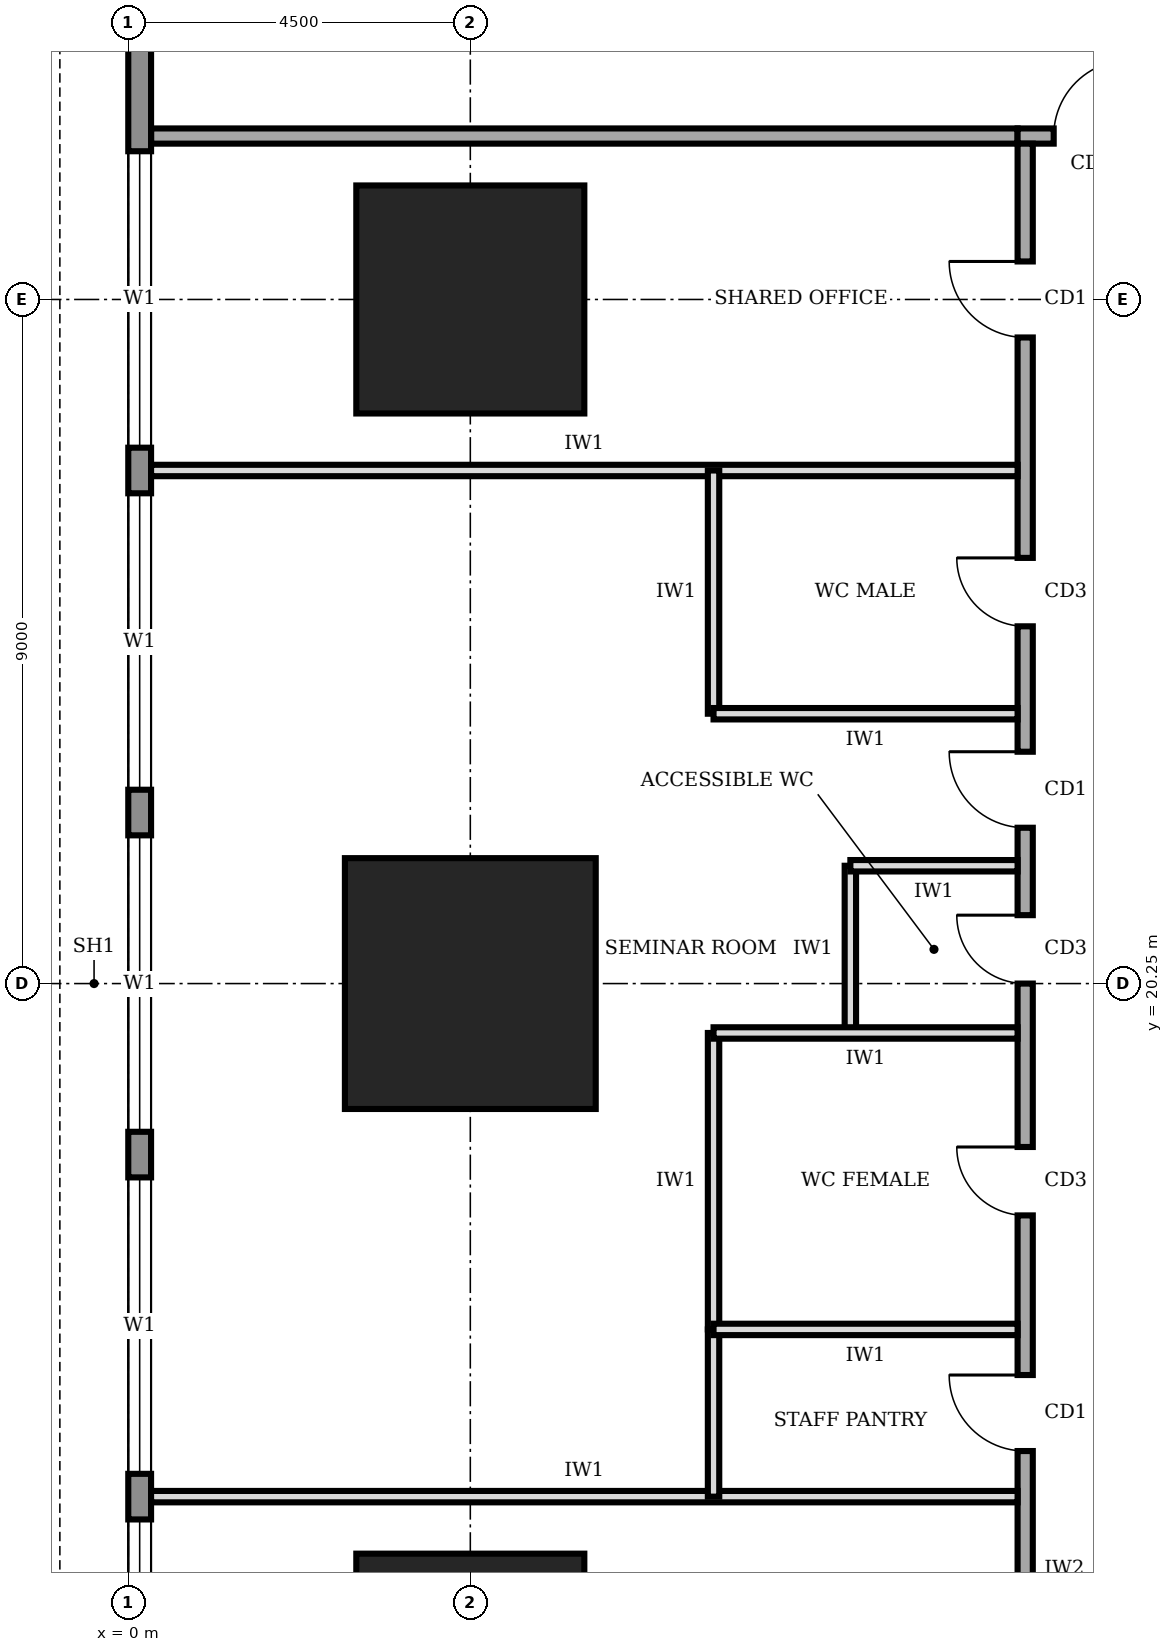
"""IFC4 building model, lengths in metres.
Left out: names, types, materials, properties, quantities, classifications, styles, units other than length and angle.
Written with IfcOpenShell. Run it as: python <this file> out.ifc"""

import sys

from ifc_helpers import new_model, si_unit, direction, frame, frame_2d, origin, origin_2d, place, context, subcontext, project, spatial, rectangle, extrude, element, fill, save


model = new_model("IFC4")
c1 = context("Model", 3, precision=1e-05, world=origin(), true_north=direction((0.0, 1.0)))
c2 = subcontext(c1, "Body", "Model", "MODEL_VIEW")
j1 = project(units=[si_unit("LENGTHUNIT", "METRE"), si_unit("PLANEANGLEUNIT", "RADIAN")], contexts=[c1])
p1 = place(None, origin())
s1 = spatial("IfcSite", under=j1, at=p1, CompositionType="ELEMENT")
p2 = place(p1, origin())
s2 = spatial("IfcBuilding", under=s1, at=p2, CompositionType="ELEMENT")
p3 = place(p2, frame((0.0, 0.0, 25.0)))
s3 = spatial("IfcBuildingStorey", under=s2, at=p3, CompositionType="ELEMENT", Elevation=25.0)
p4 = place(p3, frame((4.5, 11.25, 0.0), z_axis=(0.0, 0.0, 1.0), x_axis=(1.0, 0.0, 0.0)))
e1 = element("IfcColumn", 1, at=p4, inside=s3, PredefinedType="COLUMN", context=c2, shape_type="SweptSolid", body=[
    extrude(rectangle(XDim=3.0, YDim=3.0, at=origin_2d()), origin(), (0.0, 0.0, 1.0), 4.0),
])
p5 = place(p3, frame((4.5, 20.25, 0.0), z_axis=(0.0, 0.0, 1.0), x_axis=(1.0, 0.0, 0.0)))
e2 = element("IfcColumn", 2, at=p5, inside=s3, PredefinedType="COLUMN", context=c2, shape_type="SweptSolid", body=[
    extrude(rectangle(XDim=3.3, YDim=3.3, at=origin_2d()), origin(), (0.0, 0.0, 1.0), 4.0),
])
p6 = place(p3, frame((4.5, 29.25, 0.0), z_axis=(0.0, 0.0, 1.0), x_axis=(1.0, 0.0, 0.0)))
e3 = element("IfcColumn", 3, at=p6, inside=s3, PredefinedType="COLUMN", context=c2, shape_type="SweptSolid", body=[
    extrude(rectangle(XDim=3.0, YDim=3.0, at=origin_2d()), origin(), (0.0, 0.0, 1.0), 4.0),
])
p7 = place(p3, frame((0.15, 35.98, 0.0), z_axis=(0.0, 0.0, 1.0), x_axis=(0.0, -1.0, 0.0)))
e4 = element("IfcWall", 4, at=p7, inside=s3, PredefinedType="STANDARD", context=c2, shape_type="SweptSolid", body=[
    extrude(rectangle(XDim=31.46, YDim=0.3, at=frame_2d((15.73, 0.0))), origin(), (0.0, 0.0, 1.0), 3.75),
])
p8 = place(p7, frame((27.28, 0.0, 0.9)))
e5 = element("IfcOpeningElement", 5, at=p8, cuts=e4, PredefinedType="OPENING", context=c2, shape_type="SweptSolid", body=[
    extrude(rectangle(XDim=3.9, YDim=2.2, at=frame_2d((1.95, 1.1))), frame((0.0, 0.16, 0.0), z_axis=(0.0, -1.0, 0.0), x_axis=(1.0, 0.0, 0.0)), (0.0, 0.0, 1.0), 0.32),
])
p9 = place(p7, frame((22.78, 0.0, 0.9)))
e6 = element("IfcOpeningElement", 6, at=p9, cuts=e4, PredefinedType="OPENING", context=c2, shape_type="SweptSolid", body=[
    extrude(rectangle(XDim=3.9, YDim=2.2, at=frame_2d((1.95, 1.1))), frame((0.0, 0.16, 0.0), z_axis=(0.0, -1.0, 0.0), x_axis=(1.0, 0.0, 0.0)), (0.0, 0.0, 1.0), 0.32),
])
p10 = place(p7, frame((18.28, 0.0, 0.9)))
e7 = element("IfcOpeningElement", 7, at=p10, cuts=e4, PredefinedType="OPENING", context=c2, shape_type="SweptSolid", body=[
    extrude(rectangle(XDim=3.9, YDim=2.2, at=frame_2d((1.95, 1.1))), frame((0.0, 0.16, 0.0), z_axis=(0.0, -1.0, 0.0), x_axis=(1.0, 0.0, 0.0)), (0.0, 0.0, 1.0), 0.32),
])
p11 = place(p7, frame((13.78, 0.0, 0.9)))
e8 = element("IfcOpeningElement", 8, at=p11, cuts=e4, PredefinedType="OPENING", context=c2, shape_type="SweptSolid", body=[
    extrude(rectangle(XDim=3.9, YDim=2.2, at=frame_2d((1.95, 1.1))), frame((0.0, 0.16, 0.0), z_axis=(0.0, -1.0, 0.0), x_axis=(1.0, 0.0, 0.0)), (0.0, 0.0, 1.0), 0.32),
])
p12 = place(p7, frame((9.28, 0.0, 0.9)))
e9 = element("IfcOpeningElement", 9, at=p12, cuts=e4, PredefinedType="OPENING", context=c2, shape_type="SweptSolid", body=[
    extrude(rectangle(XDim=3.9, YDim=2.2, at=frame_2d((1.95, 1.1))), frame((0.0, 0.16, 0.0), z_axis=(0.0, -1.0, 0.0), x_axis=(1.0, 0.0, 0.0)), (0.0, 0.0, 1.0), 0.32),
])
p13 = place(p7, frame((4.78, 0.0, 0.9)))
e10 = element("IfcOpeningElement", 10, at=p13, cuts=e4, PredefinedType="OPENING", context=c2, shape_type="SweptSolid", body=[
    extrude(rectangle(XDim=3.9, YDim=2.2, at=frame_2d((1.95, 1.1))), frame((0.0, 0.16, 0.0), z_axis=(0.0, -1.0, 0.0), x_axis=(1.0, 0.0, 0.0)), (0.0, 0.0, 1.0), 0.32),
])
p14 = place(p3, frame((28.6, 31.4, 0.0), z_axis=(0.0, 0.0, 1.0), x_axis=(-1.0, 0.0, 0.0)))
e11 = element("IfcWall", 11, at=p14, inside=s3, PredefinedType="SOLIDWALL", context=c2, shape_type="SweptSolid", body=[
    extrude(rectangle(XDim=16.9, YDim=0.2, at=frame_2d((8.45, 0.0))), origin(), (0.0, 0.0, 1.0), 3.75),
])
p15 = place(p14, frame((15.425, 0.0, 0.0)))
e12 = element("IfcOpeningElement", 12, at=p15, cuts=e11, PredefinedType="OPENING", context=c2, shape_type="SweptSolid", body=[
    extrude(rectangle(XDim=1.0, YDim=2.1, at=frame_2d((0.5, 1.05))), frame((0.0, 0.11, 0.0), z_axis=(0.0, -1.0, 0.0), x_axis=(1.0, 0.0, 0.0)), (0.0, 0.0, 1.0), 0.22),
])
p16 = place(p14, frame((12.35, 0.0, 0.0)))
e13 = element("IfcOpeningElement", 13, at=p16, cuts=e11, PredefinedType="OPENING", context=c2, shape_type="SweptSolid", body=[
    extrude(rectangle(XDim=1.0, YDim=2.1, at=frame_2d((0.5, 1.05))), frame((0.0, 0.11, 0.0), z_axis=(0.0, -1.0, 0.0), x_axis=(1.0, 0.0, 0.0)), (0.0, 0.0, 1.0), 0.22),
])
p17 = place(p14, frame((5.6, 0.0, 0.0)))
e14 = element("IfcOpeningElement", 14, at=p17, cuts=e11, PredefinedType="OPENING", context=c2, shape_type="SweptSolid", body=[
    extrude(rectangle(XDim=1.0, YDim=2.1, at=frame_2d((0.5, 1.05))), frame((0.0, 0.11, 0.0), z_axis=(0.0, -1.0, 0.0), x_axis=(1.0, 0.0, 0.0)), (0.0, 0.0, 1.0), 0.22),
])
p18 = place(p14, frame((0.275, 0.0, 0.0)))
e15 = element("IfcOpeningElement", 15, at=p18, cuts=e11, PredefinedType="OPENING", context=c2, shape_type="SweptSolid", body=[
    extrude(rectangle(XDim=1.0, YDim=2.1, at=frame_2d((0.5, 1.05))), frame((0.0, 0.11, 0.0), z_axis=(0.0, -1.0, 0.0), x_axis=(1.0, 0.0, 0.0)), (0.0, 0.0, 1.0), 0.22),
])
p19 = place(p3, frame((11.8, 31.3, 0.0), z_axis=(0.0, 0.0, 1.0), x_axis=(0.0, -1.0, 0.0)))
e16 = element("IfcWall", 16, at=p19, inside=s3, PredefinedType="SOLIDWALL", context=c2, shape_type="SweptSolid", body=[
    extrude(rectangle(XDim=23.8, YDim=0.2, at=frame_2d((11.9, 0.0))), origin(), (0.0, 0.0, 1.0), 3.75),
])
p20 = place(p19, frame((20.3, 0.0, 0.0)))
e17 = element("IfcOpeningElement", 17, at=p20, cuts=e16, PredefinedType="OPENING", context=c2, shape_type="SweptSolid", body=[
    extrude(rectangle(XDim=1.0, YDim=2.1, at=frame_2d((0.5, 1.05))), frame((0.0, 0.11, 0.0), z_axis=(0.0, -1.0, 0.0), x_axis=(1.0, 0.0, 0.0)), (0.0, 0.0, 1.0), 0.22),
])
p21 = place(p19, frame((16.2, 0.0, 0.0)))
e18 = element("IfcOpeningElement", 18, at=p21, cuts=e16, PredefinedType="OPENING", context=c2, shape_type="SweptSolid", body=[
    extrude(rectangle(XDim=1.0, YDim=2.1, at=frame_2d((0.5, 1.05))), frame((0.0, 0.11, 0.0), z_axis=(0.0, -1.0, 0.0), x_axis=(1.0, 0.0, 0.0)), (0.0, 0.0, 1.0), 0.22),
])
p22 = place(p19, frame((13.2, 0.0, 0.0)))
e19 = element("IfcOpeningElement", 19, at=p22, cuts=e16, PredefinedType="OPENING", context=c2, shape_type="SweptSolid", body=[
    extrude(rectangle(XDim=0.9, YDim=2.1, at=frame_2d((0.45, 1.05))), frame((0.0, 0.11, 0.0), z_axis=(0.0, -1.0, 0.0), x_axis=(1.0, 0.0, 0.0)), (0.0, 0.0, 1.0), 0.22),
])
p23 = place(p19, frame((10.15, 0.0, 0.0)))
e20 = element("IfcOpeningElement", 20, at=p23, cuts=e16, PredefinedType="OPENING", context=c2, shape_type="SweptSolid", body=[
    extrude(rectangle(XDim=0.9, YDim=2.1, at=frame_2d((0.45, 1.05))), frame((0.0, 0.11, 0.0), z_axis=(0.0, -1.0, 0.0), x_axis=(1.0, 0.0, 0.0)), (0.0, 0.0, 1.0), 0.22),
])
p24 = place(p19, frame((5.45, 0.0, 0.0)))
e21 = element("IfcOpeningElement", 21, at=p24, cuts=e16, PredefinedType="OPENING", context=c2, shape_type="SweptSolid", body=[
    extrude(rectangle(XDim=0.9, YDim=2.1, at=frame_2d((0.45, 1.05))), frame((0.0, 0.11, 0.0), z_axis=(0.0, -1.0, 0.0), x_axis=(1.0, 0.0, 0.0)), (0.0, 0.0, 1.0), 0.22),
])
p25 = place(p19, frame((8.0, 0.0, 0.0)))
e22 = element("IfcOpeningElement", 22, at=p25, cuts=e16, PredefinedType="OPENING", context=c2, shape_type="SweptSolid", body=[
    extrude(rectangle(XDim=1.0, YDim=2.1, at=frame_2d((0.5, 1.05))), frame((0.0, 0.11, 0.0), z_axis=(0.0, -1.0, 0.0), x_axis=(1.0, 0.0, 0.0)), (0.0, 0.0, 1.0), 0.22),
])
p26 = place(p19, frame((1.55, 0.0, 0.0)))
e23 = element("IfcOpeningElement", 23, at=p26, cuts=e16, PredefinedType="OPENING", context=c2, shape_type="SweptSolid", body=[
    extrude(rectangle(XDim=1.0, YDim=2.1, at=frame_2d((0.5, 1.05))), frame((0.0, 0.11, 0.0), z_axis=(0.0, -1.0, 0.0), x_axis=(1.0, 0.0, 0.0)), (0.0, 0.0, 1.0), 0.22),
])
p27 = place(p3, frame((0.3, 31.4, 0.0), z_axis=(0.0, 0.0, 1.0), x_axis=(1.0, 0.0, 0.0)))
e24 = element("IfcWall", 24, at=p27, inside=s3, PredefinedType="SOLIDWALL", context=c2, shape_type="SweptSolid", body=[
    extrude(rectangle(XDim=11.4, YDim=0.2, at=frame_2d((5.7, 0.0))), origin(), (0.0, 0.0, 1.0), 3.75),
])
for number, where, z_axis, x_axis in (
    (25, (0.3, 13.5, 0.0), (0.0, 0.0, 1.0), (1.0, 0.0, 0.0)),
    (26, (0.3, 27.0, 0.0), (0.0, 0.0, 1.0), (1.0, 0.0, 0.0)),
):
    element("IfcWall", number, at=place(p3, frame(where, z_axis=z_axis, x_axis=x_axis)), inside=s3, PredefinedType="PARTITIONING", context=c2, shape_type="SweptSolid", body=[
        extrude(rectangle(XDim=11.4, YDim=0.15, at=frame_2d((5.7, 0.0))), origin(), (0.0, 0.0, 1.0), 3.75),
    ])
p28 = place(p3, frame((11.7, 15.7, 0.0), z_axis=(0.0, 0.0, 1.0), x_axis=(-1.0, 0.0, 0.0)))
e27 = element("IfcWall", 27, at=p28, inside=s3, PredefinedType="PARTITIONING", context=c2, shape_type="SweptSolid", body=[
    extrude(rectangle(XDim=4.0, YDim=0.15, at=frame_2d((2.0, 0.0))), origin(), (0.0, 0.0, 1.0), 3.75),
])
p29 = place(p3, frame((11.7, 19.6, 0.0), z_axis=(0.0, 0.0, 1.0), x_axis=(-1.0, 0.0, 0.0)))
e28 = element("IfcWall", 28, at=p29, inside=s3, PredefinedType="PARTITIONING", context=c2, shape_type="SweptSolid", body=[
    extrude(rectangle(XDim=4.0, YDim=0.15, at=frame_2d((2.0, 0.0))), origin(), (0.0, 0.0, 1.0), 2.85),
])
p30 = place(p3, frame((11.7, 21.8, 0.0), z_axis=(0.0, 0.0, 1.0), x_axis=(-1.0, 0.0, 0.0)))
e29 = element("IfcWall", 29, at=p30, inside=s3, PredefinedType="PARTITIONING", context=c2, shape_type="SweptSolid", body=[
    extrude(rectangle(XDim=2.2, YDim=0.15, at=frame_2d((1.1, 0.0))), origin(), (0.0, 0.0, 1.0), 3.75),
])
p31 = place(p3, frame((11.7, 23.8, 0.0), z_axis=(0.0, 0.0, 1.0), x_axis=(-1.0, 0.0, 0.0)))
e30 = element("IfcWall", 30, at=p31, inside=s3, PredefinedType="PARTITIONING", context=c2, shape_type="SweptSolid", body=[
    extrude(rectangle(XDim=4.0, YDim=0.15, at=frame_2d((2.0, 0.0))), origin(), (0.0, 0.0, 1.0), 3.75),
])
p32 = place(p3, frame((7.7, 13.5, 0.0), z_axis=(0.0, 0.0, 1.0), x_axis=(0.0, 1.0, 0.0)))
e31 = element("IfcWall", 31, at=p32, inside=s3, PredefinedType="PARTITIONING", context=c2, shape_type="SweptSolid", body=[
    extrude(rectangle(XDim=2.2, YDim=0.15, at=frame_2d((1.1, 0.0))), origin(), (0.0, 0.0, 1.0), 3.75),
])
p33 = place(p3, frame((7.7, 15.7, 0.0), z_axis=(0.0, 0.0, 1.0), x_axis=(0.0, 1.0, 0.0)))
e32 = element("IfcWall", 32, at=p33, inside=s3, PredefinedType="PARTITIONING", context=c2, shape_type="SweptSolid", body=[
    extrude(rectangle(XDim=3.9, YDim=0.15, at=frame_2d((1.95, 0.0))), origin(), (0.0, 0.0, 1.0), 3.75),
])
p34 = place(p3, frame((9.5, 19.6, 0.0), z_axis=(0.0, 0.0, 1.0), x_axis=(0.0, 1.0, 0.0)))
e33 = element("IfcWall", 33, at=p34, inside=s3, PredefinedType="PARTITIONING", context=c2, shape_type="SweptSolid", body=[
    extrude(rectangle(XDim=2.2, YDim=0.15, at=frame_2d((1.1, 0.0))), origin(), (0.0, 0.0, 1.0), 3.75),
])
p35 = place(p3, frame((7.7, 23.8, 0.0), z_axis=(0.0, 0.0, 1.0), x_axis=(0.0, 1.0, 0.0)))
e34 = element("IfcWall", 34, at=p35, inside=s3, PredefinedType="PARTITIONING", context=c2, shape_type="SweptSolid", body=[
    extrude(rectangle(XDim=3.2, YDim=0.15, at=frame_2d((1.6, 0.0))), origin(), (0.0, 0.0, 1.0), 3.75),
])
p36 = place(p9, origin())
e35 = element("IfcWindow", 35, at=p36, inside=s3, PartitioningType="SINGLE_PANEL", PredefinedType="WINDOW", context=c2, shape_type="SweptSolid", body=[
    extrude(rectangle(XDim=3.9, YDim=2.2, at=frame_2d((1.95, 1.1))), frame((0.0, 0.03, 0.0), z_axis=(0.0, -1.0, 0.0), x_axis=(1.0, 0.0, 0.0)), (0.0, 0.0, 1.0), 0.06),
])
fill(e6, e35)
p37 = place(p10, origin())
e36 = element("IfcWindow", 36, at=p37, inside=s3, PartitioningType="SINGLE_PANEL", PredefinedType="WINDOW", context=c2, shape_type="SweptSolid", body=[
    extrude(rectangle(XDim=3.9, YDim=2.2, at=frame_2d((1.95, 1.1))), frame((0.0, 0.03, 0.0), z_axis=(0.0, -1.0, 0.0), x_axis=(1.0, 0.0, 0.0)), (0.0, 0.0, 1.0), 0.06),
])
fill(e7, e36)
p38 = place(p11, origin())
e37 = element("IfcWindow", 37, at=p38, inside=s3, PartitioningType="SINGLE_PANEL", PredefinedType="WINDOW", context=c2, shape_type="SweptSolid", body=[
    extrude(rectangle(XDim=3.9, YDim=2.2, at=frame_2d((1.95, 1.1))), frame((0.0, 0.03, 0.0), z_axis=(0.0, -1.0, 0.0), x_axis=(1.0, 0.0, 0.0)), (0.0, 0.0, 1.0), 0.06),
])
fill(e8, e37)
p39 = place(p12, origin())
e38 = element("IfcWindow", 38, at=p39, inside=s3, PartitioningType="SINGLE_PANEL", PredefinedType="WINDOW", context=c2, shape_type="SweptSolid", body=[
    extrude(rectangle(XDim=3.9, YDim=2.2, at=frame_2d((1.95, 1.1))), frame((0.0, 0.03, 0.0), z_axis=(0.0, -1.0, 0.0), x_axis=(1.0, 0.0, 0.0)), (0.0, 0.0, 1.0), 0.06),
])
fill(e9, e38)
p40 = place(p13, origin())
e39 = element("IfcWindow", 39, at=p40, inside=s3, PartitioningType="SINGLE_PANEL", PredefinedType="WINDOW", context=c2, shape_type="SweptSolid", body=[
    extrude(rectangle(XDim=3.9, YDim=2.2, at=frame_2d((1.95, 1.1))), frame((0.0, 0.03, 0.0), z_axis=(0.0, -1.0, 0.0), x_axis=(1.0, 0.0, 0.0)), (0.0, 0.0, 1.0), 0.06),
])
fill(e10, e39)
p41 = place(p15, frame((1.0, 0.0, 0.0), z_axis=(0.0, 0.0, 1.0), x_axis=(-1.0, 0.0, 0.0)))
e40 = element("IfcDoor", 40, at=p41, inside=s3, OperationType="SINGLE_SWING_RIGHT", PredefinedType="DOOR", context=c2, shape_type="SweptSolid", body=[
    extrude(rectangle(XDim=1.0, YDim=2.1, at=frame_2d((0.5, 1.05))), frame((0.0, 0.025, 0.0), z_axis=(0.0, -1.0, 0.0), x_axis=(1.0, 0.0, 0.0)), (0.0, 0.0, 1.0), 0.05),
])
fill(e12, e40)
p42 = place(p21, frame((1.0, 0.0, 0.0), z_axis=(0.0, 0.0, 1.0), x_axis=(-1.0, 0.0, 0.0)))
e41 = element("IfcDoor", 41, at=p42, inside=s3, OperationType="SINGLE_SWING_RIGHT", PredefinedType="DOOR", context=c2, shape_type="SweptSolid", body=[
    extrude(rectangle(XDim=1.0, YDim=2.1, at=frame_2d((0.5, 1.05))), frame((0.0, 0.025, 0.0), z_axis=(0.0, -1.0, 0.0), x_axis=(1.0, 0.0, 0.0)), (0.0, 0.0, 1.0), 0.05),
])
fill(e18, e41)
p43 = place(p22, frame((0.9, 0.0, 0.0), z_axis=(0.0, 0.0, 1.0), x_axis=(-1.0, 0.0, 0.0)))
e42 = element("IfcDoor", 42, at=p43, inside=s3, OperationType="SINGLE_SWING_RIGHT", PredefinedType="DOOR", context=c2, shape_type="SweptSolid", body=[
    extrude(rectangle(XDim=0.9, YDim=2.1, at=frame_2d((0.45, 1.05))), frame((0.0, 0.025, 0.0), z_axis=(0.0, -1.0, 0.0), x_axis=(1.0, 0.0, 0.0)), (0.0, 0.0, 1.0), 0.05),
])
fill(e19, e42)
p44 = place(p23, frame((0.9, 0.0, 0.0), z_axis=(0.0, 0.0, 1.0), x_axis=(-1.0, 0.0, 0.0)))
e43 = element("IfcDoor", 43, at=p44, inside=s3, OperationType="SINGLE_SWING_RIGHT", PredefinedType="DOOR", context=c2, shape_type="SweptSolid", body=[
    extrude(rectangle(XDim=0.9, YDim=2.1, at=frame_2d((0.45, 1.05))), frame((0.0, 0.025, 0.0), z_axis=(0.0, -1.0, 0.0), x_axis=(1.0, 0.0, 0.0)), (0.0, 0.0, 1.0), 0.05),
])
fill(e20, e43)
p45 = place(p24, frame((0.9, 0.0, 0.0), z_axis=(0.0, 0.0, 1.0), x_axis=(-1.0, 0.0, 0.0)))
e44 = element("IfcDoor", 44, at=p45, inside=s3, OperationType="SINGLE_SWING_RIGHT", PredefinedType="DOOR", context=c2, shape_type="SweptSolid", body=[
    extrude(rectangle(XDim=0.9, YDim=2.1, at=frame_2d((0.45, 1.05))), frame((0.0, 0.025, 0.0), z_axis=(0.0, -1.0, 0.0), x_axis=(1.0, 0.0, 0.0)), (0.0, 0.0, 1.0), 0.05),
])
fill(e21, e44)
p46 = place(p25, frame((1.0, 0.0, 0.0), z_axis=(0.0, 0.0, 1.0), x_axis=(-1.0, 0.0, 0.0)))
e45 = element("IfcDoor", 45, at=p46, inside=s3, OperationType="SINGLE_SWING_RIGHT", PredefinedType="DOOR", context=c2, shape_type="SweptSolid", body=[
    extrude(rectangle(XDim=1.0, YDim=2.1, at=frame_2d((0.5, 1.05))), frame((0.0, 0.025, 0.0), z_axis=(0.0, -1.0, 0.0), x_axis=(1.0, 0.0, 0.0)), (0.0, 0.0, 1.0), 0.05),
])
fill(e22, e45)
p47 = place(p26, frame((1.0, 0.0, 0.0), z_axis=(0.0, 0.0, 1.0), x_axis=(-1.0, 0.0, 0.0)))
e46 = element("IfcDoor", 46, at=p47, inside=s3, OperationType="SINGLE_SWING_RIGHT", PredefinedType="DOOR", context=c2, shape_type="SweptSolid", body=[
    extrude(rectangle(XDim=1.0, YDim=2.1, at=frame_2d((0.5, 1.05))), frame((0.0, 0.025, 0.0), z_axis=(0.0, -1.0, 0.0), x_axis=(1.0, 0.0, 0.0)), (0.0, 0.0, 1.0), 0.05),
])
fill(e23, e46)
save(model, sys.argv[1])
